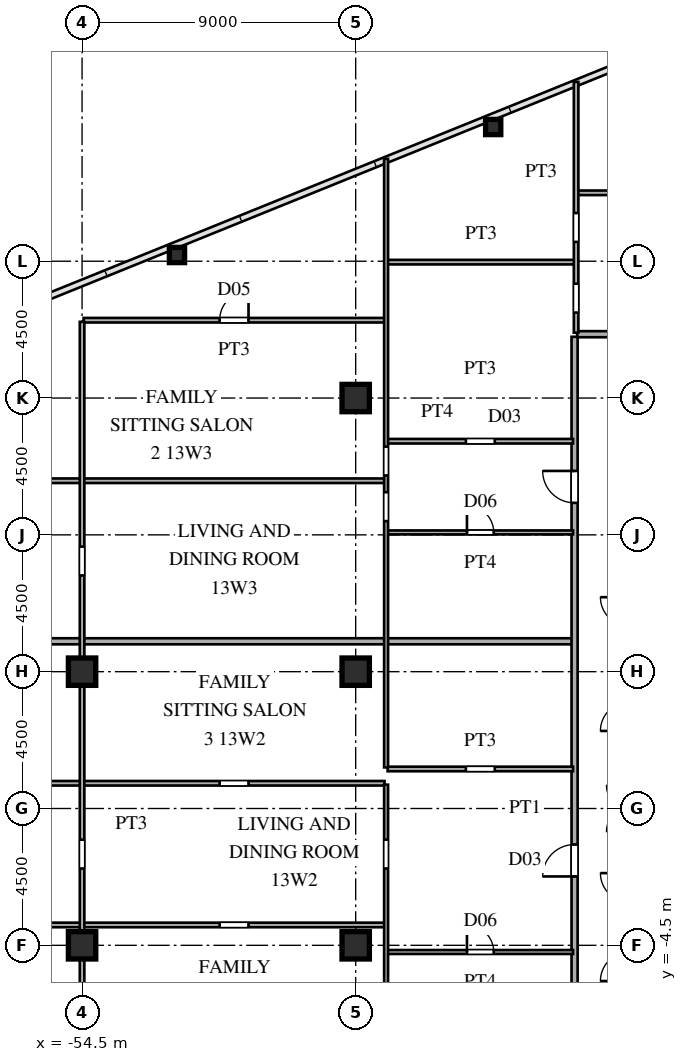
"""IFC4 building model, lengths in metres.
Left out: names, types, materials, properties, quantities, classifications, styles, units other than length and angle.
Written with IfcOpenShell. Run it as: python <this file> out.ifc"""

import sys

from ifc_helpers import new_model, si_unit, direction, frame, frame_2d, origin, origin_2d, place, context, subcontext, project, spatial, rectangle, hollow_rectangle, i_section, extrude, source, transform, mapped, element, fill, save


model = new_model("IFC4")
c1 = context("Model", 3, precision=1e-05, world=origin(), true_north=direction((0.0, 1.0)))
c2 = subcontext(c1, "Body", "Model", "MODEL_VIEW")
j1 = project(units=[si_unit("LENGTHUNIT", "METRE"), si_unit("PLANEANGLEUNIT", "RADIAN")], contexts=[c1])
p1 = place(None, origin())
s1 = spatial("IfcSite", under=j1, at=p1, CompositionType="ELEMENT")
p2 = place(p1, origin())
s2 = spatial("IfcBuilding", under=s1, at=p2, CompositionType="ELEMENT")
p3 = place(p2, frame((0.0, 0.0, 51.3)))
s3 = spatial("IfcBuildingStorey", under=s2, at=p3, CompositionType="ELEMENT", Elevation=51.3)
m1 = source(origin(), c2, "Body", "SweptSolid", [
    extrude(i_section(OverallWidth=0.9, OverallDepth=0.9, WebThickness=0.036, FlangeThickness=0.055, at=origin_2d()), origin(), (0.0, 0.0, 1.0), 3.6),
])
for number, where, z_axis, x_axis in (
    (1, (-45.5, -4.5, 0.0), (0.0, 0.0, 1.0), (1.0, 0.0, 0.0)),
    (2, (-45.5, 4.5, 0.0), (0.0, 0.0, 1.0), (1.0, 0.0, 0.0)),
    (3, (-45.5, 13.5, 0.0), (0.0, 0.0, 1.0), (1.0, 0.0, 0.0)),
    (4, (-54.5, -4.5, 0.0), (0.0, 0.0, 1.0), (1.0, 0.0, 0.0)),
    (5, (-54.5, 4.5, 0.0), (0.0, 0.0, 1.0), (1.0, 0.0, 0.0)),
):
    element("IfcColumn", number, at=place(p3, frame(where, z_axis=z_axis, x_axis=x_axis)), inside=s3, PredefinedType="COLUMN", context=c2, shape_type="MappedRepresentation", body=[
        mapped(m1, transform((0.0, 0.0, 0.0), scale=1.0)),
    ])
m2 = source(origin(), c2, "Body", "SweptSolid", [
    extrude(hollow_rectangle(XDim=0.5, YDim=0.5, WallThickness=0.02, at=origin_2d()), origin(), (0.0, 0.0, 1.0), 3.6),
])
for number, where, z_axis, x_axis in (
    (6, (-40.977, 22.414, 0.0), (0.0, 0.0, 1.0), (1.0, 0.0, 0.0)),
    (7, (-51.378, 18.204, 0.0), (0.0, 0.0, 1.0), (1.0, 0.0, 0.0)),
):
    element("IfcColumn", number, at=place(p3, frame(where, z_axis=z_axis, x_axis=x_axis)), inside=s3, PredefinedType="COLUMN", context=c2, shape_type="MappedRepresentation", body=[
        mapped(m2, transform((0.0, 0.0, 0.0), scale=1.0)),
    ])
p4 = place(p3, frame((-44.45, -4.72, 0.0), z_axis=(0.0, 0.0, 1.0), x_axis=(1.0, 0.0, 0.0)))
e8 = element("IfcWall", 8, at=p4, inside=s3, PredefinedType="PARTITIONING", context=c2, shape_type="SweptSolid", body=[
    extrude(rectangle(XDim=6.1, YDim=0.13, at=frame_2d((3.05, 0.0))), origin(), (0.0, 0.0, 1.0), 3.38),
])
p5 = place(p4, frame((2.61, 0.0, 0.0)))
e9 = element("IfcOpeningElement", 9, at=p5, cuts=e8, PredefinedType="OPENING", context=c2, shape_type="SweptSolid", body=[
    extrude(rectangle(XDim=0.88, YDim=2.1, at=frame_2d((0.44, 1.05))), frame((0.0, 0.075, 0.0), z_axis=(0.0, -1.0, 0.0), x_axis=(1.0, 0.0, 0.0)), (0.0, 0.0, 1.0), 0.15),
])
p6 = place(p3, frame((-72.535, -3.83, 0.0), z_axis=(0.0, 0.0, 1.0), x_axis=(1.0, 0.0, 0.0)))
e10 = element("IfcWall", 10, at=p6, inside=s3, PredefinedType="PARTITIONING", context=c2, shape_type="SweptSolid", body=[
    extrude(rectangle(XDim=27.985, YDim=0.15, at=frame_2d((13.992, 0.0))), origin(), (0.0, 0.0, 1.0), 3.38),
])
p7 = place(p6, frame((22.56, 0.0, 0.0)))
e11 = element("IfcOpeningElement", 11, at=p7, cuts=e10, PredefinedType="OPENING", context=c2, shape_type="SweptSolid", body=[
    extrude(rectangle(XDim=0.95, YDim=2.15, at=frame_2d((0.475, 1.075))), frame((0.0, 0.085, 0.0), z_axis=(0.0, -1.0, 0.0), x_axis=(1.0, 0.0, 0.0)), (0.0, 0.0, 1.0), 0.17),
])
p8 = place(p6, frame((14.71, 0.0, 0.0)))
e12 = element("IfcOpeningElement", 12, at=p8, cuts=e10, PredefinedType="OPENING", context=c2, shape_type="SweptSolid", body=[
    extrude(rectangle(XDim=0.95, YDim=2.15, at=frame_2d((0.475, 1.075))), frame((0.0, 0.085, 0.0), z_axis=(0.0, -1.0, 0.0), x_axis=(1.0, 0.0, 0.0)), (0.0, 0.0, 1.0), 0.17),
])
p9 = place(p3, frame((-72.535, 0.83, 0.0), z_axis=(0.0, 0.0, 1.0), x_axis=(1.0, 0.0, 0.0)))
e13 = element("IfcWall", 13, at=p9, inside=s3, PredefinedType="PARTITIONING", context=c2, shape_type="SweptSolid", body=[
    extrude(rectangle(XDim=27.985, YDim=0.15, at=frame_2d((13.992, 0.0))), origin(), (0.0, 0.0, 1.0), 3.38),
])
p10 = place(p9, frame((22.56, 0.0, 0.0)))
e14 = element("IfcOpeningElement", 14, at=p10, cuts=e13, PredefinedType="OPENING", context=c2, shape_type="SweptSolid", body=[
    extrude(rectangle(XDim=0.95, YDim=2.15, at=frame_2d((0.475, 1.075))), frame((0.0, 0.085, 0.0), z_axis=(0.0, -1.0, 0.0), x_axis=(1.0, 0.0, 0.0)), (0.0, 0.0, 1.0), 0.17),
])
p11 = place(p9, frame((14.71, 0.0, 0.0)))
e15 = element("IfcOpeningElement", 15, at=p11, cuts=e13, PredefinedType="OPENING", context=c2, shape_type="SweptSolid", body=[
    extrude(rectangle(XDim=0.95, YDim=2.15, at=frame_2d((0.475, 1.075))), frame((0.0, 0.085, 0.0), z_axis=(0.0, -1.0, 0.0), x_axis=(1.0, 0.0, 0.0)), (0.0, 0.0, 1.0), 0.17),
])
p12 = place(p3, frame((-44.45, 1.3, 0.0), z_axis=(0.0, 0.0, 1.0), x_axis=(1.0, 0.0, 0.0)))
e16 = element("IfcWall", 16, at=p12, inside=s3, PredefinedType="PARTITIONING", context=c2, shape_type="SweptSolid", body=[
    extrude(rectangle(XDim=6.1, YDim=0.15, at=frame_2d((3.05, 0.0))), origin(), (0.0, 0.0, 1.0), 3.38),
])
p13 = place(p12, frame((2.575, 0.0, 0.0)))
e17 = element("IfcOpeningElement", 17, at=p13, cuts=e16, PredefinedType="OPENING", context=c2, shape_type="SweptSolid", body=[
    extrude(rectangle(XDim=0.95, YDim=2.15, at=frame_2d((0.475, 1.075))), frame((0.0, 0.085, 0.0), z_axis=(0.0, -1.0, 0.0), x_axis=(1.0, 0.0, 0.0)), (0.0, 0.0, 1.0), 0.17),
])
p14 = place(p3, frame((-72.505, 5.5, 0.0), z_axis=(0.0, 0.0, 1.0), x_axis=(1.0, 0.0, 0.0)))
e18 = element("IfcWall", 18, at=p14, inside=s3, PredefinedType="PARTITIONING", context=c2, shape_type="SweptSolid", body=[
    extrude(rectangle(XDim=34.125, YDim=0.2, at=frame_2d((17.062, 0.0))), origin(), (0.0, 0.0, 1.0), 3.38),
])
p15 = place(p3, frame((-44.45, 9.08, 0.0), z_axis=(0.0, 0.0, 1.0), x_axis=(1.0, 0.0, 0.0)))
e19 = element("IfcWall", 19, at=p15, inside=s3, PredefinedType="PARTITIONING", context=c2, shape_type="SweptSolid", body=[
    extrude(rectangle(XDim=6.1, YDim=0.13, at=frame_2d((3.05, 0.0))), origin(), (0.0, 0.0, 1.0), 3.38),
])
p16 = place(p15, frame((2.61, 0.0, 0.0)))
e20 = element("IfcOpeningElement", 20, at=p16, cuts=e19, PredefinedType="OPENING", context=c2, shape_type="SweptSolid", body=[
    extrude(rectangle(XDim=0.88, YDim=2.1, at=frame_2d((0.44, 1.05))), frame((0.0, 0.075, 0.0), z_axis=(0.0, -1.0, 0.0), x_axis=(1.0, 0.0, 0.0)), (0.0, 0.0, 1.0), 0.15),
])
p17 = place(p3, frame((-70.613, 10.78, 0.0), z_axis=(0.0, 0.0, 1.0), x_axis=(1.0, 0.0, 0.0)))
e21 = element("IfcWall", 21, at=p17, inside=s3, PredefinedType="PARTITIONING", context=c2, shape_type="SweptSolid", body=[
    extrude(rectangle(XDim=26.063, YDim=0.15, at=frame_2d((13.031, 0.0))), origin(), (0.0, 0.0, 1.0), 3.38),
])
p18 = place(p17, frame((4.749, 0.0, 0.0)))
e22 = element("IfcOpeningElement", 22, at=p18, cuts=e21, PredefinedType="OPENING", context=c2, shape_type="SweptSolid", body=[
    extrude(rectangle(XDim=0.95, YDim=2.15, at=frame_2d((0.475, 1.075))), frame((0.0, 0.085, 0.0), z_axis=(0.0, -1.0, 0.0), x_axis=(1.0, 0.0, 0.0)), (0.0, 0.0, 1.0), 0.17),
])
p19 = place(p3, frame((-44.45, 12.08, 0.0), z_axis=(0.0, 0.0, 1.0), x_axis=(1.0, 0.0, 0.0)))
e23 = element("IfcWall", 23, at=p19, inside=s3, PredefinedType="PARTITIONING", context=c2, shape_type="SweptSolid", body=[
    extrude(rectangle(XDim=6.1, YDim=0.15, at=frame_2d((3.05, 0.0))), origin(), (0.0, 0.0, 1.0), 3.38),
])
p20 = place(p19, frame((2.575, 0.0, 0.0)))
e24 = element("IfcOpeningElement", 24, at=p20, cuts=e23, PredefinedType="OPENING", context=c2, shape_type="SweptSolid", body=[
    extrude(rectangle(XDim=0.95, YDim=2.15, at=frame_2d((0.475, 1.075))), frame((0.0, 0.085, 0.0), z_axis=(0.0, -1.0, 0.0), x_axis=(1.0, 0.0, 0.0)), (0.0, 0.0, 1.0), 0.17),
])
p21 = place(p3, frame((-38.215, 15.6, 0.0), z_axis=(0.0, 0.0, 1.0), x_axis=(1.0, 0.0, 0.0)))
e25 = element("IfcWall", 25, at=p21, inside=s3, PredefinedType="PARTITIONING", context=c2, shape_type="SweptSolid", body=[
    extrude(rectangle(XDim=1.63, YDim=0.2, at=frame_2d((0.815, 0.0))), origin(), (0.0, 0.0, 1.0), 3.38),
])
p22 = place(p3, frame((-54.45, 16.06, 0.0), z_axis=(0.0, 0.0, 1.0), x_axis=(1.0, 0.0, 0.0)))
e26 = element("IfcWall", 26, at=p22, inside=s3, PredefinedType="PARTITIONING", context=c2, shape_type="SweptSolid", body=[
    extrude(rectangle(XDim=9.9, YDim=0.15, at=frame_2d((4.95, 0.0))), origin(), (0.0, 0.0, 1.0), 3.38),
])
p23 = place(p22, frame((4.475, 0.0, 0.0)))
e27 = element("IfcOpeningElement", 27, at=p23, cuts=e26, PredefinedType="OPENING", context=c2, shape_type="SweptSolid", body=[
    extrude(rectangle(XDim=0.95, YDim=2.15, at=frame_2d((0.475, 1.075))), frame((0.0, 0.085, 0.0), z_axis=(0.0, -1.0, 0.0), x_axis=(1.0, 0.0, 0.0)), (0.0, 0.0, 1.0), 0.17),
])
p24 = place(p3, frame((-44.45, 17.97, 0.0), z_axis=(0.0, 0.0, 1.0), x_axis=(1.0, 0.0, 0.0)))
e28 = element("IfcWall", 28, at=p24, inside=s3, PredefinedType="PARTITIONING", context=c2, shape_type="SweptSolid", body=[
    extrude(rectangle(XDim=6.15, YDim=0.15, at=frame_2d((3.075, 0.0))), origin(), (0.0, 0.0, 1.0), 3.38),
])
p25 = place(p3, frame((-38.2, 20.25, 0.0), z_axis=(0.0, 0.0, 1.0), x_axis=(1.0, 0.0, 0.0)))
e29 = element("IfcWall", 29, at=p25, inside=s3, PredefinedType="PARTITIONING", context=c2, shape_type="SweptSolid", body=[
    extrude(rectangle(XDim=10.735, YDim=0.15, at=frame_2d((5.367, 0.0))), origin(), (0.0, 0.0, 1.0), 3.38),
])
p26 = place(p25, frame((4.85, 0.0, 0.0)))
e30 = element("IfcOpeningElement", 30, at=p26, cuts=e29, PredefinedType="OPENING", context=c2, shape_type="SweptSolid", body=[
    extrude(rectangle(XDim=0.95, YDim=2.15, at=frame_2d((0.475, 1.075))), frame((0.0, 0.085, 0.0), z_axis=(0.0, -1.0, 0.0), x_axis=(1.0, 0.0, 0.0)), (0.0, 0.0, 1.0), 0.17),
])
p27 = place(p3, frame((-54.5, -17.006, 0.0), z_axis=(0.0, 0.0, 1.0), x_axis=(0.0, 1.0, 0.0)))
e31 = element("IfcWall", 31, at=p27, inside=s3, PredefinedType="PARTITIONING", context=c2, shape_type="SweptSolid", body=[
    extrude(rectangle(XDim=33.012, YDim=0.15, at=frame_2d((16.506, 0.0))), origin(), (0.0, 0.0, 1.0), 2.68),
])
p28 = place(p27, frame((5.892, 0.0, 0.0)))
e32 = element("IfcOpeningElement", 32, at=p28, cuts=e31, PredefinedType="OPENING", context=c2, shape_type="SweptSolid", body=[
    extrude(rectangle(XDim=0.95, YDim=2.15, at=frame_2d((0.475, 1.075))), frame((0.0, 0.085, 0.0), z_axis=(0.0, -1.0, 0.0), x_axis=(1.0, 0.0, 0.0)), (0.0, 0.0, 1.0), 0.17),
])
p29 = place(p27, frame((15.031, 0.0, 0.0)))
e33 = element("IfcOpeningElement", 33, at=p29, cuts=e31, PredefinedType="OPENING", context=c2, shape_type="SweptSolid", body=[
    extrude(rectangle(XDim=0.95, YDim=2.15, at=frame_2d((0.475, 1.075))), frame((0.0, 0.085, 0.0), z_axis=(0.0, -1.0, 0.0), x_axis=(1.0, 0.0, 0.0)), (0.0, 0.0, 1.0), 0.17),
])
p30 = place(p27, frame((24.67, 0.0, 0.0)))
e34 = element("IfcOpeningElement", 34, at=p30, cuts=e31, PredefinedType="OPENING", context=c2, shape_type="SweptSolid", body=[
    extrude(rectangle(XDim=0.95, YDim=2.15, at=frame_2d((0.475, 1.075))), frame((0.0, 0.085, 0.0), z_axis=(0.0, -1.0, 0.0), x_axis=(1.0, 0.0, 0.0)), (0.0, 0.0, 1.0), 0.17),
])
p31 = place(p3, frame((-44.5, -21.368, 0.0), z_axis=(0.0, 0.0, 1.0), x_axis=(0.0, 1.0, 0.0)))
e35 = element("IfcWall", 35, at=p31, inside=s3, PredefinedType="PARTITIONING", context=c2, shape_type="SweptSolid", body=[
    extrude(rectangle(XDim=22.151, YDim=0.13, at=frame_2d((11.075, 0.0))), origin(), (0.0, 0.0, 1.0), 3.38),
])
p32 = place(p31, frame((8.932, 0.0, 0.0)))
e36 = element("IfcOpeningElement", 36, at=p32, cuts=e35, PredefinedType="OPENING", context=c2, shape_type="SweptSolid", body=[
    extrude(rectangle(XDim=0.95, YDim=2.15, at=frame_2d((0.475, 1.075))), frame((0.0, 0.075, 0.0), z_axis=(0.0, -1.0, 0.0), x_axis=(1.0, 0.0, 0.0)), (0.0, 0.0, 1.0), 0.15),
])
p33 = place(p31, frame((0.724, 0.0, 0.0)))
e37 = element("IfcOpeningElement", 37, at=p33, cuts=e35, PredefinedType="OPENING", context=c2, shape_type="SweptSolid", body=[
    extrude(rectangle(XDim=0.95, YDim=2.15, at=frame_2d((0.475, 1.075))), frame((0.0, 0.075, 0.0), z_axis=(0.0, -1.0, 0.0), x_axis=(1.0, 0.0, 0.0)), (0.0, 0.0, 1.0), 0.15),
])
p34 = place(p31, frame((19.393, 0.0, 0.0)))
e38 = element("IfcOpeningElement", 38, at=p34, cuts=e35, PredefinedType="OPENING", context=c2, shape_type="SweptSolid", body=[
    extrude(rectangle(XDim=0.95, YDim=2.15, at=frame_2d((0.475, 1.075))), frame((0.0, 0.075, 0.0), z_axis=(0.0, -1.0, 0.0), x_axis=(1.0, 0.0, 0.0)), (0.0, 0.0, 1.0), 0.15),
])
p35 = place(p3, frame((-44.5, 1.352, 0.0), z_axis=(0.0, 0.0, 1.0), x_axis=(0.0, 1.0, 0.0)))
e39 = element("IfcWall", 39, at=p35, inside=s3, PredefinedType="PARTITIONING", context=c2, shape_type="SweptSolid", body=[
    extrude(rectangle(XDim=20.016, YDim=0.13, at=frame_2d((10.008, 0.0))), origin(), (0.0, 0.0, 1.0), 3.38),
])
p36 = place(p35, frame((8.101, 0.0, 0.0)))
e40 = element("IfcOpeningElement", 40, at=p36, cuts=e39, PredefinedType="OPENING", context=c2, shape_type="SweptSolid", body=[
    extrude(rectangle(XDim=0.95, YDim=2.15, at=frame_2d((0.475, 1.075))), frame((0.0, 0.075, 0.0), z_axis=(0.0, -1.0, 0.0), x_axis=(1.0, 0.0, 0.0)), (0.0, 0.0, 1.0), 0.15),
])
p37 = place(p35, frame((9.601, 0.0, 0.0)))
e41 = element("IfcOpeningElement", 41, at=p37, cuts=e39, PredefinedType="OPENING", context=c2, shape_type="SweptSolid", body=[
    extrude(rectangle(XDim=0.95, YDim=2.15, at=frame_2d((0.475, 1.075))), frame((0.0, 0.075, 0.0), z_axis=(0.0, -1.0, 0.0), x_axis=(1.0, 0.0, 0.0)), (0.0, 0.0, 1.0), 0.15),
])
p38 = place(p3, frame((-38.3, -15.515, 0.0), z_axis=(0.0, 0.0, 1.0), x_axis=(0.0, 1.0, 0.0)))
e42 = element("IfcWall", 42, at=p38, inside=s3, PredefinedType="PARTITIONING", context=c2, shape_type="SweptSolid", body=[
    extrude(rectangle(XDim=31.03, YDim=0.2, at=frame_2d((15.515, 0.0))), origin(), (0.0, 0.0, 1.0), 3.38),
])
p39 = place(p38, frame((2.345, 0.0, 0.0)))
e43 = element("IfcOpeningElement", 43, at=p39, cuts=e42, PredefinedType="OPENING", context=c2, shape_type="SweptSolid", body=[
    extrude(rectangle(XDim=1.05, YDim=2.25, at=frame_2d((0.525, 1.125))), frame((0.0, 0.11, 0.0), z_axis=(0.0, -1.0, 0.0), x_axis=(1.0, 0.0, 0.0)), (0.0, 0.0, 1.0), 0.22),
])
p40 = place(p38, frame((13.28, 0.0, 0.0)))
e44 = element("IfcOpeningElement", 44, at=p40, cuts=e42, PredefinedType="OPENING", context=c2, shape_type="SweptSolid", body=[
    extrude(rectangle(XDim=1.05, YDim=2.25, at=frame_2d((0.525, 1.125))), frame((0.0, 0.11, 0.0), z_axis=(0.0, -1.0, 0.0), x_axis=(1.0, 0.0, 0.0)), (0.0, 0.0, 1.0), 0.22),
])
p41 = place(p38, frame((25.567, 0.0, 0.0)))
e45 = element("IfcOpeningElement", 45, at=p41, cuts=e42, PredefinedType="OPENING", context=c2, shape_type="SweptSolid", body=[
    extrude(rectangle(XDim=1.05, YDim=2.25, at=frame_2d((0.525, 1.125))), frame((0.0, 0.11, 0.0), z_axis=(0.0, -1.0, 0.0), x_axis=(1.0, 0.0, 0.0)), (0.0, 0.0, 1.0), 0.22),
])
p42 = place(p3, frame((-38.25, 15.65, 0.0), z_axis=(0.0, 0.0, 1.0), x_axis=(0.0, 1.0, 0.0)))
e46 = element("IfcWall", 46, at=p42, inside=s3, PredefinedType="PARTITIONING", context=c2, shape_type="SweptSolid", body=[
    extrude(rectangle(XDim=8.248, YDim=0.15, at=frame_2d((4.124, 0.0))), origin(), (0.0, 0.0, 1.0), 3.38),
])
p43 = place(p42, frame((0.66, 0.0, 0.0)))
e47 = element("IfcOpeningElement", 47, at=p43, cuts=e46, PredefinedType="OPENING", context=c2, shape_type="SweptSolid", body=[
    extrude(rectangle(XDim=0.95, YDim=2.15, at=frame_2d((0.475, 1.075))), frame((0.0, 0.085, 0.0), z_axis=(0.0, -1.0, 0.0), x_axis=(1.0, 0.0, 0.0)), (0.0, 0.0, 1.0), 0.17),
])
p44 = place(p42, frame((2.985, 0.0, 0.0)))
e48 = element("IfcOpeningElement", 48, at=p44, cuts=e46, PredefinedType="OPENING", context=c2, shape_type="SweptSolid", body=[
    extrude(rectangle(XDim=0.95, YDim=2.15, at=frame_2d((0.475, 1.075))), frame((0.0, 0.085, 0.0), z_axis=(0.0, -1.0, 0.0), x_axis=(1.0, 0.0, 0.0)), (0.0, 0.0, 1.0), 0.17),
])
m3 = source(origin(), c2, "Body", "SweptSolid", [
    extrude(rectangle(XDim=0.88, YDim=2.1, at=frame_2d((0.44, 1.05))), frame((0.0, 0.025, 0.0), z_axis=(0.0, -1.0, 0.0), x_axis=(1.0, 0.0, 0.0)), (0.0, 0.0, 1.0), 0.05),
])
p45 = place(p5, origin())
e49 = element("IfcDoor", 49, at=p45, inside=s3, OperationType="SINGLE_SWING_LEFT", PredefinedType="DOOR", context=c2, shape_type="MappedRepresentation", body=[
    mapped(m3, transform((0.0, 0.0, 0.0), scale=1.0)),
])
fill(e9, e49)
p46 = place(p16, origin())
e50 = element("IfcDoor", 50, at=p46, inside=s3, OperationType="SINGLE_SWING_LEFT", PredefinedType="DOOR", context=c2, shape_type="MappedRepresentation", body=[
    mapped(m3, transform((0.0, 0.0, 0.0), scale=1.0)),
])
fill(e20, e50)
m4 = source(origin(), c2, "Body", "SweptSolid", [
    extrude(rectangle(XDim=0.95, YDim=2.15, at=frame_2d((0.475, 1.075))), frame((0.0, 0.025, 0.0), z_axis=(0.0, -1.0, 0.0), x_axis=(1.0, 0.0, 0.0)), (0.0, 0.0, 1.0), 0.05),
])
p47 = place(p23, origin())
e51 = element("IfcDoor", 51, at=p47, inside=s3, OperationType="SINGLE_SWING_RIGHT", PredefinedType="DOOR", context=c2, shape_type="MappedRepresentation", body=[
    mapped(m4, transform((0.0, 0.0, 0.0), scale=1.0)),
])
fill(e27, e51)
m5 = source(origin(), c2, "Body", "SweptSolid", [
    extrude(rectangle(XDim=1.05, YDim=2.25, at=frame_2d((0.525, 1.125))), frame((0.0, 0.025, 0.0), z_axis=(0.0, -1.0, 0.0), x_axis=(1.0, 0.0, 0.0)), (0.0, 0.0, 1.0), 0.05),
])
p48 = place(p40, origin())
e52 = element("IfcDoor", 52, at=p48, inside=s3, OperationType="SINGLE_SWING_LEFT", PredefinedType="DOOR", context=c2, shape_type="MappedRepresentation", body=[
    mapped(m5, transform((0.0, 0.0, 0.0), scale=1.0)),
])
fill(e44, e52)
p49 = place(p41, origin())
e53 = element("IfcDoor", 53, at=p49, inside=s3, OperationType="SINGLE_SWING_RIGHT", PredefinedType="DOOR", context=c2, shape_type="MappedRepresentation", body=[
    mapped(m5, transform((0.0, 0.0, 0.0), scale=1.0)),
])
fill(e45, e53)
save(model, sys.argv[1])
